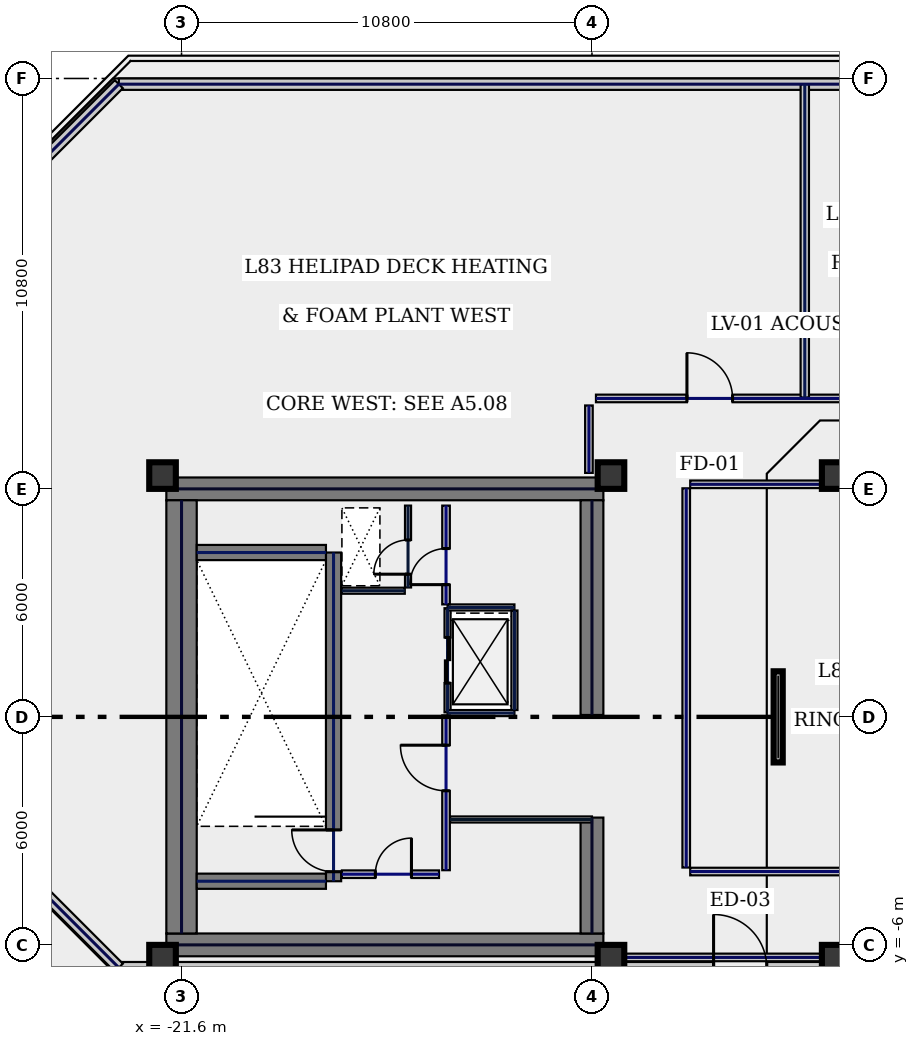
"""IFC4 building model, lengths in metres.
Left out: names, types, materials, properties, quantities, classifications, styles, units other than length and angle.
Written with IfcOpenShell. Run it as: python <this file> out.ifc"""

import sys

from ifc_helpers import new_model, si_unit, direction, frame, frame_2d, origin, origin_2d, place, context, subcontext, project, spatial, rectangle, hollow_rectangle, extrude, element, fill, save


model = new_model("IFC4")
c1 = context("Model", 3, precision=1e-05, world=origin(), true_north=direction((0.0, 1.0)))
c2 = subcontext(c1, "Body", "Model", "MODEL_VIEW")
j1 = project(units=[si_unit("LENGTHUNIT", "METRE"), si_unit("PLANEANGLEUNIT", "RADIAN")], contexts=[c1])
p1 = place(None, origin())
s1 = spatial("IfcSite", under=j1, at=p1, CompositionType="ELEMENT")
p2 = place(p1, origin())
s2 = spatial("IfcBuilding", under=s1, at=p2, CompositionType="ELEMENT")
p3 = place(p2, frame((0.0, 0.0, 357.0)))
s3 = spatial("IfcBuildingStorey", under=s2, at=p3, CompositionType="ELEMENT", Elevation=357.0)
for number, where, z_axis, x_axis in (
    (1, (-22.0, 6.0, 0.0), (0.0, 0.0, 1.0), (1.0, 0.0, 0.0)),
    (2, (-22.0, -6.0, 0.0), (0.0, 0.0, 1.0), (1.0, 0.0, 0.0)),
):
    element("IfcWall", number, at=place(p3, frame(where, z_axis=z_axis, x_axis=x_axis)), inside=s3, PredefinedType="SHEAR", context=c2, shape_type="SweptSolid", body=[
        extrude(rectangle(XDim=11.5, YDim=0.6, at=frame_2d((5.75, 0.0))), origin(), (0.0, 0.0, 1.0), 3.7),
    ])
p4 = place(p3, frame((-21.6, -5.7, 0.0), z_axis=(0.0, 0.0, 1.0), x_axis=(0.0, 1.0, 0.0)))
e3 = element("IfcWall", 3, at=p4, inside=s3, PredefinedType="SHEAR", context=c2, shape_type="SweptSolid", body=[
    extrude(rectangle(XDim=11.4, YDim=0.8, at=frame_2d((5.7, 0.0))), origin(), (0.0, 0.0, 1.0), 3.7),
])
p5 = place(p3, frame((-10.8, -5.7, 0.0), z_axis=(0.0, 0.0, 1.0), x_axis=(0.0, 1.0, 0.0)))
e4 = element("IfcWall", 4, at=p5, inside=s3, PredefinedType="SHEAR", context=c2, shape_type="SweptSolid", body=[
    extrude(rectangle(XDim=3.05, YDim=0.6, at=frame_2d((1.525, 0.0))), origin(), (0.0, 0.0, 1.0), 3.7),
])
p6 = place(p3, frame((-10.8, 0.05, 0.0), z_axis=(0.0, 0.0, 1.0), x_axis=(0.0, 1.0, 0.0)))
e5 = element("IfcWall", 5, at=p6, inside=s3, PredefinedType="SHEAR", context=c2, shape_type="SweptSolid", body=[
    extrude(rectangle(XDim=5.65, YDim=0.6, at=frame_2d((2.825, 0.0))), origin(), (0.0, 0.0, 1.0), 3.7),
])
p7 = place(p3, frame((-17.6, -4.325, 0.0), z_axis=(0.0, 0.0, 1.0), x_axis=(0.0, 1.0, 0.0)))
e6 = element("IfcWall", 6, at=p7, inside=s3, PredefinedType="SHEAR", context=c2, shape_type="SweptSolid", body=[
    extrude(rectangle(XDim=8.65, YDim=0.4, at=frame_2d((4.325, 0.0))), origin(), (0.0, 0.0, 1.0), 3.7),
])
p8 = place(p7, frame((0.25, 0.0, 0.0)))
e7 = element("IfcOpeningElement", 7, at=p8, cuts=e6, PredefinedType="OPENING", context=c2, shape_type="SweptSolid", body=[
    extrude(rectangle(XDim=1.1, YDim=2.2, at=frame_2d((0.55, 1.1))), frame((0.0, 0.21, 0.0), z_axis=(0.0, -1.0, 0.0), x_axis=(1.0, 0.0, 0.0)), (0.0, 0.0, 1.0), 0.42),
])
for number, where, z_axis, x_axis in (
    (8, (-21.2, -4.325, 0.0), (0.0, 0.0, 1.0), (1.0, 0.0, 0.0)),
    (9, (-21.2, 4.325, 0.0), (0.0, 0.0, 1.0), (1.0, 0.0, 0.0)),
):
    element("IfcWall", number, at=place(p3, frame(where, z_axis=z_axis, x_axis=x_axis)), inside=s3, PredefinedType="SHEAR", context=c2, shape_type="SweptSolid", body=[
        extrude(rectangle(XDim=3.4, YDim=0.4, at=frame_2d((1.7, 0.0))), origin(), (0.0, 0.0, 1.0), 3.7),
    ])
for number, where, z_axis, x_axis in (
    (10, (-22.1, -6.35, 0.0), (0.0, 0.0, 1.0), (1.0, 0.0, 0.0)),
    (11, (-22.1, 6.35, 0.0), (0.0, 0.0, 1.0), (1.0, 0.0, 0.0)),
    (12, (-10.3, -6.35, 0.0), (0.0, 0.0, 1.0), (1.0, 0.0, 0.0)),
    (13, (-10.3, 6.35, 0.0), (0.0, 0.0, 1.0), (1.0, 0.0, 0.0)),
    (14, (-4.4, -6.35, 0.0), (0.0, 0.0, 1.0), (1.0, 0.0, 0.0)),
    (15, (-4.4, 6.35, 0.0), (0.0, 0.0, 1.0), (1.0, 0.0, 0.0)),
):
    element("IfcColumn", number, at=place(p3, frame(where, z_axis=z_axis, x_axis=x_axis)), inside=s3, PredefinedType="COLUMN", context=c2, shape_type="SweptSolid", body=[
        extrude(hollow_rectangle(XDim=0.7, YDim=0.7, WallThickness=0.032, at=origin_2d()), origin(), (0.0, 0.0, 1.0), 3.7),
    ])
p9 = place(p3, frame((-23.25, -6.6, 0.0), z_axis=(0.0, 0.0, 1.0), x_axis=(1.0, 0.0, 0.0)))
e16 = element("IfcWall", 16, at=p9, inside=s3, PredefinedType="STANDARD", context=c2, shape_type="SweptSolid", body=[
    extrude(rectangle(XDim=46.5, YDim=0.3, at=frame_2d((23.25, 0.0))), origin(), (0.0, 0.0, 1.0), 2.695),
])
p10 = place(p9, frame((15.65, 0.0, 0.32)))
e17 = element("IfcOpeningElement", 17, at=p10, cuts=e16, PredefinedType="OPENING", context=c2, shape_type="SweptSolid", body=[
    extrude(rectangle(XDim=1.4, YDim=2.2, at=frame_2d((0.7, 1.1))), frame((0.0, 0.16, 0.0), z_axis=(0.0, -1.0, 0.0), x_axis=(1.0, 0.0, 0.0)), (0.0, 0.0, 1.0), 0.32),
])
p11 = place(p9, frame((29.45, 0.0, 0.32)))
e18 = element("IfcOpeningElement", 18, at=p11, cuts=e16, PredefinedType="OPENING", context=c2, shape_type="SweptSolid", body=[
    extrude(rectangle(XDim=1.4, YDim=2.2, at=frame_2d((0.7, 1.1))), frame((0.0, 0.16, 0.0), z_axis=(0.0, -1.0, 0.0), x_axis=(1.0, 0.0, 0.0)), (0.0, 0.0, 1.0), 0.32),
])
p12 = place(p3, frame((23.25, 16.65, 0.0), z_axis=(0.0, 0.0, 1.0), x_axis=(-1.0, 0.0, 0.0)))
e19 = element("IfcWall", 19, at=p12, inside=s3, PredefinedType="STANDARD", context=c2, shape_type="SweptSolid", body=[
    extrude(rectangle(XDim=46.5, YDim=0.3, at=frame_2d((23.25, 0.0))), origin(), (0.0, 0.0, 1.0), 3.7),
])
for number, where, z_axis, x_axis in (
    (20, (-23.25, 16.65, 0.0), (0.0, 0.0, 1.0), (-0.707, -0.707, 0.0)),
    (21, (-25.25, -4.6, 0.0), (0.0, 0.0, 1.0), (0.707, -0.707, 0.0)),
):
    element("IfcWall", number, at=place(p3, frame(where, z_axis=z_axis, x_axis=x_axis)), inside=s3, PredefinedType="STANDARD", context=c2, shape_type="SweptSolid", body=[
        extrude(rectangle(XDim=2.828, YDim=0.3, at=frame_2d((1.414, 0.0))), origin(), (0.0, 0.0, 1.0), 3.7),
    ])
p13 = place(p3, frame((-14.6, 0.12, 0.0), z_axis=(0.0, 0.0, 1.0), x_axis=(0.0, 1.0, 0.0)))
e22 = element("IfcWall", 22, at=p13, inside=s3, PredefinedType="PARTITIONING", context=c2, shape_type="SweptSolid", body=[
    extrude(rectangle(XDim=2.74, YDim=0.16, at=frame_2d((1.37, 0.0))), origin(), (0.0, 0.0, 1.0), 5.5),
])
p14 = place(p13, frame((0.77, 0.0, 0.0)))
e23 = element("IfcOpeningElement", 23, at=p14, cuts=e22, PredefinedType="OPENING", context=c2, shape_type="SweptSolid", body=[
    extrude(rectangle(XDim=1.2, YDim=2.2, at=frame_2d((0.6, 1.1))), frame((0.0, 0.09, 0.0), z_axis=(0.0, -1.0, 0.0), x_axis=(1.0, 0.0, 0.0)), (0.0, 0.0, 1.0), 0.18),
])
for number, where, z_axis, x_axis in (
    (24, (-14.6, 0.1, 0.0), (0.0, 0.0, 1.0), (1.0, 0.0, 0.0)),
    (25, (-14.6, 2.88, 0.0), (0.0, 0.0, 1.0), (1.0, 0.0, 0.0)),
):
    element("IfcWall", number, at=place(p3, frame(where, z_axis=z_axis, x_axis=x_axis)), inside=s3, PredefinedType="PARTITIONING", context=c2, shape_type="SweptSolid", body=[
        extrude(rectangle(XDim=1.76, YDim=0.16, at=frame_2d((0.88, 0.0))), origin(), (0.0, 0.0, 1.0), 5.5),
    ])
p15 = place(p3, frame((-12.84, 0.18, 0.0), z_axis=(0.0, 0.0, 1.0), x_axis=(0.0, 1.0, 0.0)))
e26 = element("IfcWall", 26, at=p15, inside=s3, PredefinedType="PARTITIONING", context=c2, shape_type="SweptSolid", body=[
    extrude(rectangle(XDim=2.62, YDim=0.16, at=frame_2d((1.31, 0.0))), origin(), (0.0, 0.0, 1.0), 5.5),
])
p16 = place(p3, frame((-15.64, 3.405, 0.0), z_axis=(0.0, 0.0, 1.0), x_axis=(0.0, 1.0, 0.0)))
e27 = element("IfcWall", 27, at=p16, inside=s3, PredefinedType="PARTITIONING", context=c2, shape_type="SweptSolid", body=[
    extrude(rectangle(XDim=2.155, YDim=0.16, at=frame_2d((1.078, 0.0))), origin(), (0.0, 0.0, 1.0), 3.7),
])
p17 = place(p16, frame((0.35, 0.0, 0.0)))
e28 = element("IfcOpeningElement", 28, at=p17, cuts=e27, PredefinedType="OPENING", context=c2, shape_type="SweptSolid", body=[
    extrude(rectangle(XDim=0.9, YDim=2.2, at=frame_2d((0.45, 1.1))), frame((0.0, 0.09, 0.0), z_axis=(0.0, -1.0, 0.0), x_axis=(1.0, 0.0, 0.0)), (0.0, 0.0, 1.0), 0.18),
])
p18 = place(p3, frame((-17.38, 3.32, 0.0), z_axis=(0.0, 0.0, 1.0), x_axis=(1.0, 0.0, 0.0)))
e29 = element("IfcWall", 29, at=p18, inside=s3, PredefinedType="PARTITIONING", context=c2, shape_type="SweptSolid", body=[
    extrude(rectangle(XDim=1.655, YDim=0.16, at=frame_2d((0.827, 0.0))), origin(), (0.0, 0.0, 1.0), 3.7),
])
p19 = place(p3, frame((-17.38, -4.14, 0.0), z_axis=(0.0, 0.0, 1.0), x_axis=(1.0, 0.0, 0.0)))
e30 = element("IfcWall", 30, at=p19, inside=s3, PredefinedType="SOLIDWALL", context=c2, shape_type="SweptSolid", body=[
    extrude(rectangle(XDim=2.555, YDim=0.2, at=frame_2d((1.277, 0.0))), origin(), (0.0, 0.0, 1.0), 3.7),
])
p20 = place(p19, frame((0.88, 0.0, 0.0)))
e31 = element("IfcOpeningElement", 31, at=p20, cuts=e30, PredefinedType="OPENING", context=c2, shape_type="SweptSolid", body=[
    extrude(rectangle(XDim=0.95, YDim=2.2, at=frame_2d((0.475, 1.1))), frame((0.0, 0.11, 0.0), z_axis=(0.0, -1.0, 0.0), x_axis=(1.0, 0.0, 0.0)), (0.0, 0.0, 1.0), 0.22),
])
p21 = place(p3, frame((-14.535, -2.7, 0.0), z_axis=(0.0, 0.0, 1.0), x_axis=(1.0, 0.0, 0.0)))
e32 = element("IfcWall", 32, at=p21, inside=s3, PredefinedType="PARTITIONING", context=c2, shape_type="SweptSolid", body=[
    extrude(rectangle(XDim=3.735, YDim=0.16, at=frame_2d((1.867, 0.0))), origin(), (0.0, 0.0, 1.0), 3.7),
])
p22 = place(p3, frame((-14.64, 2.96, 0.0), z_axis=(0.0, 0.0, 1.0), x_axis=(0.0, 1.0, 0.0)))
e33 = element("IfcWall", 33, at=p22, inside=s3, PredefinedType="SOLIDWALL", context=c2, shape_type="SweptSolid", body=[
    extrude(rectangle(XDim=2.6, YDim=0.2, at=frame_2d((1.3, 0.0))), origin(), (0.0, 0.0, 1.0), 3.7),
])
p23 = place(p22, frame((0.52, 0.0, 0.0)))
e34 = element("IfcOpeningElement", 34, at=p23, cuts=e33, PredefinedType="OPENING", context=c2, shape_type="SweptSolid", body=[
    extrude(rectangle(XDim=0.95, YDim=2.2, at=frame_2d((0.475, 1.1))), frame((0.0, 0.11, 0.0), z_axis=(0.0, -1.0, 0.0), x_axis=(1.0, 0.0, 0.0)), (0.0, 0.0, 1.0), 0.22),
])
p24 = place(p3, frame((-14.64, -4.035, 0.0), z_axis=(0.0, 0.0, 1.0), x_axis=(0.0, 1.0, 0.0)))
e35 = element("IfcWall", 35, at=p24, inside=s3, PredefinedType="SOLIDWALL", context=c2, shape_type="SweptSolid", body=[
    extrude(rectangle(XDim=4.075, YDim=0.2, at=frame_2d((2.038, 0.0))), origin(), (0.0, 0.0, 1.0), 3.7),
])
p25 = place(p24, frame((2.09, 0.0, 0.0)))
e36 = element("IfcOpeningElement", 36, at=p25, cuts=e35, PredefinedType="OPENING", context=c2, shape_type="SweptSolid", body=[
    extrude(rectangle(XDim=1.2, YDim=2.2, at=frame_2d((0.6, 1.1))), frame((0.0, 0.11, 0.0), z_axis=(0.0, -1.0, 0.0), x_axis=(1.0, 0.0, 0.0)), (0.0, 0.0, 1.0), 0.22),
])
p26 = place(p3, frame((-10.88, 6.42, 0.0), z_axis=(0.0, 0.0, 1.0), x_axis=(0.0, 1.0, 0.0)))
e37 = element("IfcWall", 37, at=p26, inside=s3, PredefinedType="SOLIDWALL", context=c2, shape_type="SweptSolid", body=[
    extrude(rectangle(XDim=1.775, YDim=0.2, at=frame_2d((0.888, 0.0))), origin(), (0.0, 0.0, 1.0), 3.7),
])
p27 = place(p3, frame((-10.695, 8.38, 0.0), z_axis=(0.0, 0.0, 1.0), x_axis=(1.0, 0.0, 0.0)))
e38 = element("IfcWall", 38, at=p27, inside=s3, PredefinedType="SOLIDWALL", context=c2, shape_type="SweptSolid", body=[
    extrude(rectangle(XDim=21.39, YDim=0.2, at=frame_2d((10.695, 0.0))), origin(), (0.0, 0.0, 1.0), 3.7),
])
p28 = place(p27, frame((10.2, 0.0, 0.0)))
e39 = element("IfcOpeningElement", 39, at=p28, cuts=e38, PredefinedType="OPENING", context=c2, shape_type="SweptSolid", body=[
    extrude(rectangle(XDim=1.2, YDim=2.2, at=frame_2d((0.6, 1.1))), frame((0.0, 0.11, 0.0), z_axis=(0.0, -1.0, 0.0), x_axis=(1.0, 0.0, 0.0)), (0.0, 0.0, 1.0), 0.22),
])
p29 = place(p27, frame((2.394, 0.0, 0.0)))
e40 = element("IfcOpeningElement", 40, at=p29, cuts=e38, PredefinedType="OPENING", context=c2, shape_type="SweptSolid", body=[
    extrude(rectangle(XDim=1.2, YDim=2.2, at=frame_2d((0.6, 1.1))), frame((0.0, 0.11, 0.0), z_axis=(0.0, -1.0, 0.0), x_axis=(1.0, 0.0, 0.0)), (0.0, 0.0, 1.0), 0.22),
])
p30 = place(p27, frame((18.006, 0.0, 0.0)))
e41 = element("IfcOpeningElement", 41, at=p30, cuts=e38, PredefinedType="OPENING", context=c2, shape_type="SweptSolid", body=[
    extrude(rectangle(XDim=1.2, YDim=2.2, at=frame_2d((0.6, 1.1))), frame((0.0, 0.11, 0.0), z_axis=(0.0, -1.0, 0.0), x_axis=(1.0, 0.0, 0.0)), (0.0, 0.0, 1.0), 0.22),
])
p31 = place(p3, frame((10.38, -6.33, 0.0), z_axis=(0.0, 0.0, 1.0), x_axis=(-1.0, 0.0, 0.0)))
e42 = element("IfcWall", 42, at=p31, inside=s3, PredefinedType="SOLIDWALL", context=c2, shape_type="SweptSolid", body=[
    extrude(rectangle(XDim=20.76, YDim=0.2, at=frame_2d((10.38, 0.0))), origin(), (0.0, 0.0, 1.0), 2.695),
])
p32 = place(p3, frame((8.215, 6.12, 0.0), z_axis=(0.0, 0.0, 1.0), x_axis=(-1.0, 0.0, 0.0)))
e43 = element("IfcWall", 43, at=p32, inside=s3, PredefinedType="SOLIDWALL", context=c2, shape_type="SweptSolid", body=[
    extrude(rectangle(XDim=16.43, YDim=0.2, at=frame_2d((8.215, 0.0))), origin(), (0.0, 0.0, 1.0), 2.695),
])
p33 = place(p32, frame((2.44, 0.0, 0.0)))
e44 = element("IfcOpeningElement", 44, at=p33, cuts=e43, PredefinedType="OPENING", context=c2, shape_type="SweptSolid", body=[
    extrude(rectangle(XDim=0.95, YDim=2.2, at=frame_2d((0.475, 1.1))), frame((0.0, 0.11, 0.0), z_axis=(0.0, -1.0, 0.0), x_axis=(1.0, 0.0, 0.0)), (0.0, 0.0, 1.0), 0.22),
])
p34 = place(p3, frame((-8.32, 6.015, 0.0), z_axis=(0.0, 0.0, 1.0), x_axis=(0.0, -1.0, 0.0)))
e45 = element("IfcWall", 45, at=p34, inside=s3, PredefinedType="SOLIDWALL", context=c2, shape_type="SweptSolid", body=[
    extrude(rectangle(XDim=9.98, YDim=0.2, at=frame_2d((4.99, 0.0))), origin(), (0.0, 0.0, 1.0), 3.7),
])
p35 = place(p3, frame((-8.215, -4.07, 0.0), z_axis=(0.0, 0.0, 1.0), x_axis=(1.0, 0.0, 0.0)))
e46 = element("IfcWall", 46, at=p35, inside=s3, PredefinedType="SOLIDWALL", context=c2, shape_type="SweptSolid", body=[
    extrude(rectangle(XDim=16.43, YDim=0.2, at=frame_2d((8.215, 0.0))), origin(), (0.0, 0.0, 1.0), 3.7),
])
p36 = place(p3, frame((-5.2, 8.405, 0.0), z_axis=(0.0, 0.0, 1.0), x_axis=(0.0, 1.0, 0.0)))
e47 = element("IfcWall", 47, at=p36, inside=s3, PredefinedType="SOLIDWALL", context=c2, shape_type="SweptSolid", body=[
    extrude(rectangle(XDim=8.245, YDim=0.22, at=frame_2d((4.123, 0.0))), origin(), (0.0, 0.0, 1.0), 3.7),
])
p37 = place(p8, origin())
e48 = element("IfcDoor", 48, at=p37, inside=s3, OperationType="SINGLE_SWING_RIGHT", PredefinedType="DOOR", context=c2, shape_type="SweptSolid", body=[
    extrude(rectangle(XDim=1.1, YDim=2.2, at=frame_2d((0.55, 1.1))), frame((0.0, 0.025, 0.0), z_axis=(0.0, -1.0, 0.0), x_axis=(1.0, 0.0, 0.0)), (0.0, 0.0, 1.0), 0.05),
])
fill(e7, e48)
p38 = place(p14, origin())
e49 = element("IfcDoor", 49, at=p38, inside=s3, OperationType="SLIDING_TO_LEFT", PredefinedType="DOOR", context=c2, shape_type="SweptSolid", body=[
    extrude(rectangle(XDim=1.2, YDim=2.2, at=frame_2d((0.6, 1.1))), frame((0.0, 0.025, 0.0), z_axis=(0.0, -1.0, 0.0), x_axis=(1.0, 0.0, 0.0)), (0.0, 0.0, 1.0), 0.05),
])
fill(e23, e49)
p39 = place(p17, origin())
e50 = element("IfcDoor", 50, at=p39, inside=s3, OperationType="SINGLE_SWING_LEFT", PredefinedType="DOOR", context=c2, shape_type="SweptSolid", body=[
    extrude(rectangle(XDim=0.9, YDim=2.2, at=frame_2d((0.45, 1.1))), frame((0.0, 0.025, 0.0), z_axis=(0.0, -1.0, 0.0), x_axis=(1.0, 0.0, 0.0)), (0.0, 0.0, 1.0), 0.05),
])
fill(e28, e50)
p40 = place(p20, origin())
e51 = element("IfcDoor", 51, at=p40, inside=s3, OperationType="SINGLE_SWING_RIGHT", PredefinedType="DOOR", context=c2, shape_type="SweptSolid", body=[
    extrude(rectangle(XDim=0.95, YDim=2.2, at=frame_2d((0.475, 1.1))), frame((0.0, 0.025, 0.0), z_axis=(0.0, -1.0, 0.0), x_axis=(1.0, 0.0, 0.0)), (0.0, 0.0, 1.0), 0.05),
])
fill(e31, e51)
p41 = place(p23, origin())
e52 = element("IfcDoor", 52, at=p41, inside=s3, OperationType="SINGLE_SWING_LEFT", PredefinedType="DOOR", context=c2, shape_type="SweptSolid", body=[
    extrude(rectangle(XDim=0.95, YDim=2.2, at=frame_2d((0.475, 1.1))), frame((0.0, 0.025, 0.0), z_axis=(0.0, -1.0, 0.0), x_axis=(1.0, 0.0, 0.0)), (0.0, 0.0, 1.0), 0.05),
])
fill(e34, e52)
p42 = place(p25, origin())
e53 = element("IfcDoor", 53, at=p42, inside=s3, OperationType="SINGLE_SWING_RIGHT", PredefinedType="DOOR", context=c2, shape_type="SweptSolid", body=[
    extrude(rectangle(XDim=1.2, YDim=2.2, at=frame_2d((0.6, 1.1))), frame((0.0, 0.025, 0.0), z_axis=(0.0, -1.0, 0.0), x_axis=(1.0, 0.0, 0.0)), (0.0, 0.0, 1.0), 0.05),
])
fill(e36, e53)
p43 = place(p29, origin())
e54 = element("IfcDoor", 54, at=p43, inside=s3, OperationType="SINGLE_SWING_LEFT", PredefinedType="DOOR", context=c2, shape_type="SweptSolid", body=[
    extrude(rectangle(XDim=1.2, YDim=2.2, at=frame_2d((0.6, 1.1))), frame((0.0, 0.025, 0.0), z_axis=(0.0, -1.0, 0.0), x_axis=(1.0, 0.0, 0.0)), (0.0, 0.0, 1.0), 0.05),
])
fill(e40, e54)
save(model, sys.argv[1])
